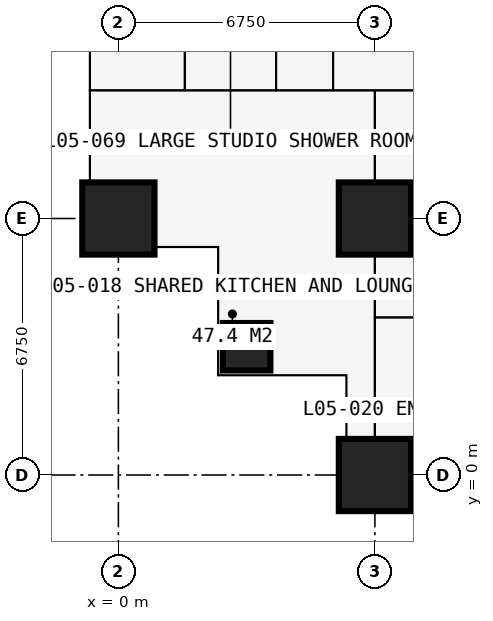
"""IFC4 building model, lengths in metres.
Left out: names, types, materials, properties, quantities, classifications, styles, units other than length and angle.
Written with IfcOpenShell. Run it as: python <this file> out.ifc"""

import sys

from ifc_helpers import new_model, si_unit, direction, frame, frame_2d, origin, origin_2d, place, context, subcontext, project, spatial, rectangle, extrude, element, fill, save


model = new_model("IFC4")
c1 = context("Model", 3, precision=1e-05, world=origin(), true_north=direction((0.0, 1.0)))
c2 = subcontext(c1, "Body", "Model", "MODEL_VIEW")
j1 = project(units=[si_unit("LENGTHUNIT", "METRE"), si_unit("PLANEANGLEUNIT", "RADIAN")], contexts=[c1])
p1 = place(None, origin())
s1 = spatial("IfcSite", under=j1, at=p1, CompositionType="ELEMENT")
p2 = place(p1, origin())
s2 = spatial("IfcBuilding", under=s1, at=p2, CompositionType="ELEMENT")
p3 = place(p2, frame((0.0, 0.0, 21.6)))
s3 = spatial("IfcBuildingStorey", under=s2, at=p3, CompositionType="ELEMENT", Elevation=21.6)
p4 = place(p3, frame((0.0, 6.75, 0.0), z_axis=(0.0, 0.0, 1.0), x_axis=(1.0, 0.0, 0.0)))
e1 = element("IfcColumn", 1, at=p4, inside=s3, PredefinedType="COLUMN", context=c2, shape_type="SweptSolid", body=[
    extrude(rectangle(XDim=1.9, YDim=1.9, at=origin_2d()), origin(), (0.0, 0.0, 1.0), 3.6),
])
p5 = place(p3, frame((3.375, 3.375, 0.0), z_axis=(0.0, 0.0, 1.0), x_axis=(1.0, 0.0, 0.0)))
e2 = element("IfcColumn", 2, at=p5, inside=s3, PredefinedType="COLUMN", context=c2, shape_type="SweptSolid", body=[
    extrude(rectangle(XDim=1.25, YDim=1.25, at=origin_2d()), origin(), (0.0, 0.0, 1.0), 3.6),
])
for number, where, z_axis, x_axis in (
    (3, (6.75, 0.0, 0.0), (0.0, 0.0, 1.0), (1.0, 0.0, 0.0)),
    (4, (6.75, 6.75, 0.0), (0.0, 0.0, 1.0), (1.0, 0.0, 0.0)),
):
    element("IfcColumn", number, at=place(p3, frame(where, z_axis=z_axis, x_axis=x_axis)), inside=s3, PredefinedType="COLUMN", context=c2, shape_type="SweptSolid", body=[
        extrude(rectangle(XDim=1.9, YDim=1.9, at=origin_2d()), origin(), (0.0, 0.0, 1.0), 3.6),
    ])
p6 = place(p3, frame((-0.75, 6.0, 0.0), z_axis=(0.0, 0.0, 1.0), x_axis=(1.0, 0.0, 0.0)))
e5 = element("IfcWall", 5, at=p6, inside=s3, PredefinedType="SOLIDWALL", context=c2, shape_type="SweptSolid", body=[
    extrude(rectangle(XDim=3.375, YDim=0.3, at=frame_2d((1.688, 0.0))), origin(), (0.0, 0.0, 1.0), 3.375),
])
p7 = place(p6, frame((1.857, 0.0, 0.9)))
e6 = element("IfcOpeningElement", 6, at=p7, cuts=e5, PredefinedType="OPENING", context=c2, shape_type="SweptSolid", body=[
    extrude(rectangle(XDim=1.2, YDim=1.8, at=frame_2d((0.6, 0.9))), frame((0.0, 0.16, 0.0), z_axis=(0.0, -1.0, 0.0), x_axis=(1.0, 0.0, 0.0)), (0.0, 0.0, 1.0), 0.32),
])
p8 = place(p3, frame((2.625, 6.0, 0.0), z_axis=(0.0, 0.0, 1.0), x_axis=(0.0, -1.0, 0.0)))
e7 = element("IfcWall", 7, at=p8, inside=s3, PredefinedType="SOLIDWALL", context=c2, shape_type="SweptSolid", body=[
    extrude(rectangle(XDim=3.375, YDim=0.3, at=frame_2d((1.688, 0.0))), origin(), (0.0, 0.0, 1.0), 3.375),
])
p9 = place(p8, frame((0.788, 0.0, 0.6)))
e8 = element("IfcOpeningElement", 8, at=p9, cuts=e7, PredefinedType="OPENING", context=c2, shape_type="SweptSolid", body=[
    extrude(rectangle(XDim=1.8, YDim=2.1, at=frame_2d((0.9, 1.05))), frame((0.0, 0.16, 0.0), z_axis=(0.0, -1.0, 0.0), x_axis=(1.0, 0.0, 0.0)), (0.0, 0.0, 1.0), 0.32),
])
p10 = place(p3, frame((2.625, 2.625, 0.0), z_axis=(0.0, 0.0, 1.0), x_axis=(1.0, 0.0, 0.0)))
e9 = element("IfcWall", 9, at=p10, inside=s3, PredefinedType="SOLIDWALL", context=c2, shape_type="SweptSolid", body=[
    extrude(rectangle(XDim=3.375, YDim=0.3, at=frame_2d((1.688, 0.0))), origin(), (0.0, 0.0, 1.0), 3.375),
])
p11 = place(p10, frame((0.788, 0.0, 0.6)))
e10 = element("IfcOpeningElement", 10, at=p11, cuts=e9, PredefinedType="OPENING", context=c2, shape_type="SweptSolid", body=[
    extrude(rectangle(XDim=1.8, YDim=2.1, at=frame_2d((0.9, 1.05))), frame((0.0, 0.16, 0.0), z_axis=(0.0, -1.0, 0.0), x_axis=(1.0, 0.0, 0.0)), (0.0, 0.0, 1.0), 0.32),
])
p12 = place(p3, frame((6.0, 2.625, 0.0), z_axis=(0.0, 0.0, 1.0), x_axis=(0.0, -1.0, 0.0)))
e11 = element("IfcWall", 11, at=p12, inside=s3, PredefinedType="SOLIDWALL", context=c2, shape_type="SweptSolid", body=[
    extrude(rectangle(XDim=3.375, YDim=0.3, at=frame_2d((1.688, 0.0))), origin(), (0.0, 0.0, 1.0), 3.375),
])
p13 = place(p12, frame((0.317, 0.0, 0.9)))
e12 = element("IfcOpeningElement", 12, at=p13, cuts=e11, PredefinedType="OPENING", context=c2, shape_type="SweptSolid", body=[
    extrude(rectangle(XDim=1.2, YDim=1.8, at=frame_2d((0.6, 0.9))), frame((0.0, 0.16, 0.0), z_axis=(0.0, -1.0, 0.0), x_axis=(1.0, 0.0, 0.0)), (0.0, 0.0, 1.0), 0.32),
])
p14 = place(p3, frame((-0.734, 10.125, 0.0), z_axis=(0.0, 0.0, 1.0), x_axis=(1.0, 0.0, 0.0)))
e13 = element("IfcWall", 13, at=p14, inside=s3, PredefinedType="PARTITIONING", context=c2, shape_type="SweptSolid", body=[
    extrude(rectangle(XDim=10.859, YDim=0.15, at=frame_2d((5.429, 0.0))), origin(), (0.0, 0.0, 1.0), 3.375),
])
p15 = place(p14, frame((5.134, 0.0, 0.0)))
e14 = element("IfcOpeningElement", 14, at=p15, cuts=e13, PredefinedType="OPENING", context=c2, shape_type="SweptSolid", body=[
    extrude(rectangle(XDim=1.0, YDim=2.2, at=frame_2d((0.5, 1.1))), frame((0.0, 0.085, 0.0), z_axis=(0.0, -1.0, 0.0), x_axis=(1.0, 0.0, 0.0)), (0.0, 0.0, 1.0), 0.17),
])
p16 = place(p3, frame((1.75, 10.125, 0.0), z_axis=(0.0, 0.0, 1.0), x_axis=(0.0, 1.0, 0.0)))
e15 = element("IfcWall", 15, at=p16, inside=s3, PredefinedType="PARTITIONING", context=c2, shape_type="SweptSolid", body=[
    extrude(rectangle(XDim=2.6, YDim=0.1, at=frame_2d((1.3, 0.0))), origin(), (0.0, 0.0, 1.0), 3.375),
])
p17 = place(p16, frame((0.85, 0.0, 0.0)))
e16 = element("IfcOpeningElement", 16, at=p17, cuts=e15, PredefinedType="OPENING", context=c2, shape_type="SweptSolid", body=[
    extrude(rectangle(XDim=0.9, YDim=2.2, at=frame_2d((0.45, 1.1))), frame((0.0, 0.06, 0.0), z_axis=(0.0, -1.0, 0.0), x_axis=(1.0, 0.0, 0.0)), (0.0, 0.0, 1.0), 0.12),
])
p18 = place(p3, frame((4.15, 10.125, 0.0), z_axis=(0.0, 0.0, 1.0), x_axis=(0.0, 1.0, 0.0)))
e17 = element("IfcWall", 17, at=p18, inside=s3, PredefinedType="PARTITIONING", context=c2, shape_type="SweptSolid", body=[
    extrude(rectangle(XDim=23.625, YDim=0.15, at=frame_2d((11.812, 0.0))), origin(), (0.0, 0.0, 1.0), 3.375),
])
p19 = place(p18, frame((20.5, 0.0, 0.0)))
e18 = element("IfcOpeningElement", 18, at=p19, cuts=e17, PredefinedType="OPENING", context=c2, shape_type="SweptSolid", body=[
    extrude(rectangle(XDim=0.95, YDim=2.2, at=frame_2d((0.475, 1.1))), frame((0.0, 0.085, 0.0), z_axis=(0.0, -1.0, 0.0), x_axis=(1.0, 0.0, 0.0)), (0.0, 0.0, 1.0), 0.17),
])
p20 = place(p18, frame((17.125, 0.0, 0.0)))
e19 = element("IfcOpeningElement", 19, at=p20, cuts=e17, PredefinedType="OPENING", context=c2, shape_type="SweptSolid", body=[
    extrude(rectangle(XDim=0.95, YDim=2.2, at=frame_2d((0.475, 1.1))), frame((0.0, 0.085, 0.0), z_axis=(0.0, -1.0, 0.0), x_axis=(1.0, 0.0, 0.0)), (0.0, 0.0, 1.0), 0.17),
])
p21 = place(p18, frame((13.7, 0.0, 0.0)))
e20 = element("IfcOpeningElement", 20, at=p21, cuts=e17, PredefinedType="OPENING", context=c2, shape_type="SweptSolid", body=[
    extrude(rectangle(XDim=0.95, YDim=2.2, at=frame_2d((0.475, 1.1))), frame((0.0, 0.085, 0.0), z_axis=(0.0, -1.0, 0.0), x_axis=(1.0, 0.0, 0.0)), (0.0, 0.0, 1.0), 0.17),
])
p22 = place(p18, frame((4.2, 0.0, 0.0)))
e21 = element("IfcOpeningElement", 21, at=p22, cuts=e17, PredefinedType="OPENING", context=c2, shape_type="SweptSolid", body=[
    extrude(rectangle(XDim=0.95, YDim=2.2, at=frame_2d((0.475, 1.1))), frame((0.0, 0.085, 0.0), z_axis=(0.0, -1.0, 0.0), x_axis=(1.0, 0.0, 0.0)), (0.0, 0.0, 1.0), 0.17),
])
p23 = place(p18, frame((10.95, 0.0, 0.0)))
e22 = element("IfcOpeningElement", 22, at=p23, cuts=e17, PredefinedType="OPENING", context=c2, shape_type="SweptSolid", body=[
    extrude(rectangle(XDim=0.95, YDim=2.2, at=frame_2d((0.475, 1.1))), frame((0.0, 0.085, 0.0), z_axis=(0.0, -1.0, 0.0), x_axis=(1.0, 0.0, 0.0)), (0.0, 0.0, 1.0), 0.17),
])
p24 = place(p3, frame((5.65, 10.125, 0.0), z_axis=(0.0, 0.0, 1.0), x_axis=(0.0, 1.0, 0.0)))
e23 = element("IfcWall", 23, at=p24, inside=s3, PredefinedType="PARTITIONING", context=c2, shape_type="SweptSolid", body=[
    extrude(rectangle(XDim=10.762, YDim=0.15, at=frame_2d((5.381, 0.0))), origin(), (0.0, 0.0, 1.0), 3.375),
])
p25 = place(p24, frame((4.9, 0.0, 0.0)))
e24 = element("IfcOpeningElement", 24, at=p25, cuts=e23, PredefinedType="OPENING", context=c2, shape_type="SweptSolid", body=[
    extrude(rectangle(XDim=0.95, YDim=2.2, at=frame_2d((0.475, 1.1))), frame((0.0, 0.085, 0.0), z_axis=(0.0, -1.0, 0.0), x_axis=(1.0, 0.0, 0.0)), (0.0, 0.0, 1.0), 0.17),
])
p26 = place(p3, frame((6.75, -0.734, 0.0), z_axis=(0.0, 0.0, 1.0), x_axis=(0.0, 1.0, 0.0)))
e25 = element("IfcWall", 25, at=p26, inside=s3, PredefinedType="PARTITIONING", context=c2, shape_type="SweptSolid", body=[
    extrude(rectangle(XDim=10.859, YDim=0.15, at=frame_2d((5.429, 0.0))), origin(), (0.0, 0.0, 1.0), 2.877),
])
p27 = place(p3, frame((6.75, 4.15, 0.0), z_axis=(0.0, 0.0, 1.0), x_axis=(1.0, 0.0, 0.0)))
e26 = element("IfcWall", 26, at=p27, inside=s3, PredefinedType="PARTITIONING", context=c2, shape_type="SweptSolid", body=[
    extrude(rectangle(XDim=23.625, YDim=0.1, at=frame_2d((11.812, 0.0))), origin(), (0.0, 0.0, 1.0), 3.375),
])
p28 = place(p27, frame((0.2, 0.0, 0.0)))
e27 = element("IfcOpeningElement", 27, at=p28, cuts=e26, PredefinedType="OPENING", context=c2, shape_type="SweptSolid", body=[
    extrude(rectangle(XDim=0.95, YDim=2.2, at=frame_2d((0.475, 1.1))), frame((0.0, 0.06, 0.0), z_axis=(0.0, -1.0, 0.0), x_axis=(1.0, 0.0, 0.0)), (0.0, 0.0, 1.0), 0.12),
])
p29 = place(p27, frame((3.625, 0.0, 0.0)))
e28 = element("IfcOpeningElement", 28, at=p29, cuts=e26, PredefinedType="OPENING", context=c2, shape_type="SweptSolid", body=[
    extrude(rectangle(XDim=0.95, YDim=2.2, at=frame_2d((0.475, 1.1))), frame((0.0, 0.06, 0.0), z_axis=(0.0, -1.0, 0.0), x_axis=(1.0, 0.0, 0.0)), (0.0, 0.0, 1.0), 0.12),
])
p30 = place(p27, frame((7.0, 0.0, 0.0)))
e29 = element("IfcOpeningElement", 29, at=p30, cuts=e26, PredefinedType="OPENING", context=c2, shape_type="SweptSolid", body=[
    extrude(rectangle(XDim=0.95, YDim=2.2, at=frame_2d((0.475, 1.1))), frame((0.0, 0.06, 0.0), z_axis=(0.0, -1.0, 0.0), x_axis=(1.0, 0.0, 0.0)), (0.0, 0.0, 1.0), 0.12),
])
p31 = place(p27, frame((10.375, 0.0, 0.0)))
e30 = element("IfcOpeningElement", 30, at=p31, cuts=e26, PredefinedType="OPENING", context=c2, shape_type="SweptSolid", body=[
    extrude(rectangle(XDim=0.95, YDim=2.2, at=frame_2d((0.475, 1.1))), frame((0.0, 0.06, 0.0), z_axis=(0.0, -1.0, 0.0), x_axis=(1.0, 0.0, 0.0)), (0.0, 0.0, 1.0), 0.12),
])
p32 = place(p27, frame((18.475, 0.0, 0.0)))
e31 = element("IfcOpeningElement", 31, at=p32, cuts=e26, PredefinedType="OPENING", context=c2, shape_type="SweptSolid", body=[
    extrude(rectangle(XDim=0.95, YDim=2.2, at=frame_2d((0.475, 1.1))), frame((0.0, 0.06, 0.0), z_axis=(0.0, -1.0, 0.0), x_axis=(1.0, 0.0, 0.0)), (0.0, 0.0, 1.0), 0.12),
])
p33 = place(p27, frame((13.7, 0.0, 0.0)))
e32 = element("IfcOpeningElement", 32, at=p33, cuts=e26, PredefinedType="OPENING", context=c2, shape_type="SweptSolid", body=[
    extrude(rectangle(XDim=0.95, YDim=2.2, at=frame_2d((0.475, 1.1))), frame((0.0, 0.06, 0.0), z_axis=(0.0, -1.0, 0.0), x_axis=(1.0, 0.0, 0.0)), (0.0, 0.0, 1.0), 0.12),
])
p34 = place(p7, origin())
e33 = element("IfcWindow", 33, at=p34, inside=s3, PartitioningType="SINGLE_PANEL", PredefinedType="WINDOW", context=c2, shape_type="SweptSolid", body=[
    extrude(rectangle(XDim=1.2, YDim=1.8, at=frame_2d((0.6, 0.9))), frame((0.0, 0.03, 0.0), z_axis=(0.0, -1.0, 0.0), x_axis=(1.0, 0.0, 0.0)), (0.0, 0.0, 1.0), 0.06),
])
fill(e6, e33)
p35 = place(p9, origin())
e34 = element("IfcWindow", 34, at=p35, inside=s3, PartitioningType="SINGLE_PANEL", PredefinedType="WINDOW", context=c2, shape_type="SweptSolid", body=[
    extrude(rectangle(XDim=1.8, YDim=2.1, at=frame_2d((0.9, 1.05))), frame((0.0, 0.03, 0.0), z_axis=(0.0, -1.0, 0.0), x_axis=(1.0, 0.0, 0.0)), (0.0, 0.0, 1.0), 0.06),
])
fill(e8, e34)
p36 = place(p11, origin())
e35 = element("IfcWindow", 35, at=p36, inside=s3, PartitioningType="SINGLE_PANEL", PredefinedType="WINDOW", context=c2, shape_type="SweptSolid", body=[
    extrude(rectangle(XDim=1.8, YDim=2.1, at=frame_2d((0.9, 1.05))), frame((0.0, 0.03, 0.0), z_axis=(0.0, -1.0, 0.0), x_axis=(1.0, 0.0, 0.0)), (0.0, 0.0, 1.0), 0.06),
])
fill(e10, e35)
p37 = place(p13, origin())
e36 = element("IfcWindow", 36, at=p37, inside=s3, PartitioningType="SINGLE_PANEL", PredefinedType="WINDOW", context=c2, shape_type="SweptSolid", body=[
    extrude(rectangle(XDim=1.2, YDim=1.8, at=frame_2d((0.6, 0.9))), frame((0.0, 0.03, 0.0), z_axis=(0.0, -1.0, 0.0), x_axis=(1.0, 0.0, 0.0)), (0.0, 0.0, 1.0), 0.06),
])
fill(e12, e36)
p38 = place(p15, origin())
e37 = element("IfcDoor", 37, at=p38, inside=s3, OperationType="SINGLE_SWING_LEFT", PredefinedType="DOOR", context=c2, shape_type="SweptSolid", body=[
    extrude(rectangle(XDim=1.0, YDim=2.2, at=frame_2d((0.5, 1.1))), frame((0.0, 0.025, 0.0), z_axis=(0.0, -1.0, 0.0), x_axis=(1.0, 0.0, 0.0)), (0.0, 0.0, 1.0), 0.05),
])
fill(e14, e37)
p39 = place(p28, origin())
e38 = element("IfcDoor", 38, at=p39, inside=s3, OperationType="SINGLE_SWING_LEFT", PredefinedType="DOOR", context=c2, shape_type="SweptSolid", body=[
    extrude(rectangle(XDim=0.95, YDim=2.2, at=frame_2d((0.475, 1.1))), frame((0.0, 0.025, 0.0), z_axis=(0.0, -1.0, 0.0), x_axis=(1.0, 0.0, 0.0)), (0.0, 0.0, 1.0), 0.05),
])
fill(e27, e38)
p40 = place(p17, origin())
e39 = element("IfcDoor", 39, at=p40, inside=s3, OperationType="SINGLE_SWING_RIGHT", PredefinedType="DOOR", context=c2, shape_type="SweptSolid", body=[
    extrude(rectangle(XDim=0.9, YDim=2.2, at=frame_2d((0.45, 1.1))), frame((0.0, 0.025, 0.0), z_axis=(0.0, -1.0, 0.0), x_axis=(1.0, 0.0, 0.0)), (0.0, 0.0, 1.0), 0.05),
])
fill(e16, e39)
save(model, sys.argv[1])
